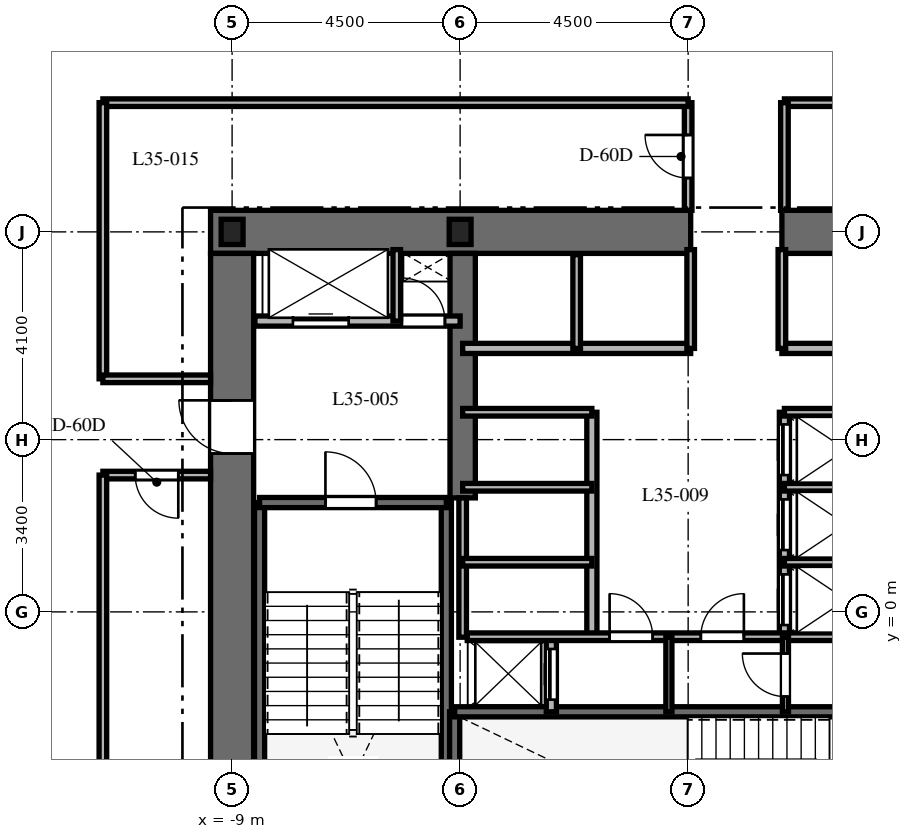
"""IFC4 building model, lengths in metres.
Left out: names, types, materials, properties, quantities, classifications, styles, units other than length and angle.
Written with IfcOpenShell. Run it as: python <this file> out.ifc"""

import sys

from ifc_helpers import new_model, si_unit, direction, frame, frame_2d, origin, origin_2d, place, context, subcontext, project, spatial, rectangle, i_section, extrude, element, fill, save


model = new_model("IFC4")
c1 = context("Model", 3, precision=1e-05, world=origin(), true_north=direction((0.0, 1.0)))
c2 = subcontext(c1, "Body", "Model", "MODEL_VIEW")
j1 = project(units=[si_unit("LENGTHUNIT", "METRE"), si_unit("PLANEANGLEUNIT", "RADIAN")], contexts=[c1])
p1 = place(None, origin())
s1 = spatial("IfcSite", under=j1, at=p1, CompositionType="ELEMENT")
p2 = place(p1, origin())
s2 = spatial("IfcBuilding", under=s1, at=p2, CompositionType="ELEMENT")
p3 = place(p2, frame((0.0, 0.0, 144.3)))
s3 = spatial("IfcBuildingStorey", under=s2, at=p3, CompositionType="ELEMENT", Elevation=144.3)
p4 = place(p3, frame((-9.425, 7.5, 0.0), z_axis=(0.0, 0.0, 1.0), x_axis=(1.0, 0.0, 0.0)))
e1 = element("IfcWall", 1, at=p4, inside=s3, PredefinedType="SHEAR", context=c2, shape_type="SweptSolid", body=[
    extrude(rectangle(XDim=9.475, YDim=0.85, at=frame_2d((4.738, 0.0))), origin(), (0.0, 0.0, 1.0), 3.7),
])
p5 = place(p3, frame((1.85, 7.5, 0.0), z_axis=(0.0, 0.0, 1.0), x_axis=(1.0, 0.0, 0.0)))
e2 = element("IfcWall", 2, at=p5, inside=s3, PredefinedType="SHEAR", context=c2, shape_type="SweptSolid", body=[
    extrude(rectangle(XDim=7.575, YDim=0.85, at=frame_2d((3.788, 0.0))), origin(), (0.0, 0.0, 1.0), 3.7),
])
p6 = place(p3, frame((-9.0, -7.075, 0.0), z_axis=(0.0, 0.0, 1.0), x_axis=(0.0, 1.0, 0.0)))
e3 = element("IfcWall", 3, at=p6, inside=s3, PredefinedType="SHEAR", context=c2, shape_type="SweptSolid", body=[
    extrude(rectangle(XDim=14.15, YDim=0.85, at=frame_2d((7.075, 0.0))), origin(), (0.0, 0.0, 1.0), 3.7),
])
p7 = place(p6, frame((10.2, 0.0, 0.0)))
e4 = element("IfcOpeningElement", 4, at=p7, cuts=e3, PredefinedType="OPENING", context=c2, shape_type="SweptSolid", body=[
    extrude(rectangle(XDim=1.05, YDim=2.15, at=frame_2d((0.525, 1.075))), frame((0.0, 0.435, 0.0), z_axis=(0.0, -1.0, 0.0), x_axis=(1.0, 0.0, 0.0)), (0.0, 0.0, 1.0), 0.87),
])
p8 = place(p3, frame((-4.45, 2.25, 0.0), z_axis=(0.0, 0.0, 1.0), x_axis=(0.0, 1.0, 0.0)))
e5 = element("IfcWall", 5, at=p8, inside=s3, PredefinedType="SHEAR", context=c2, shape_type="SweptSolid", body=[
    extrude(rectangle(XDim=4.825, YDim=0.5, at=frame_2d((2.413, 0.0))), origin(), (0.0, 0.0, 1.0), 3.7),
])
for number, where, z_axis, x_axis in (
    (6, (-8.458, -6.985, 0.0), (0.0, 0.0, 1.0), (0.0, 1.0, 0.0)),
    (7, (-4.772, -6.985, 0.0), (0.0, 0.0, 1.0), (0.0, 1.0, 0.0)),
):
    element("IfcWall", number, at=place(p3, frame(where, z_axis=z_axis, x_axis=x_axis)), inside=s3, PredefinedType="SHEAR", context=c2, shape_type="SweptSolid", body=[
        extrude(rectangle(XDim=9.143, YDim=0.2, at=frame_2d((4.572, 0.0))), origin(), (0.0, 0.0, 1.0), 3.7),
    ])
p9 = place(p3, frame((-8.458, 2.158, 0.0), z_axis=(0.0, 0.0, 1.0), x_axis=(1.0, 0.0, 0.0)))
e8 = element("IfcWall", 8, at=p9, inside=s3, PredefinedType="SHEAR", context=c2, shape_type="SweptSolid", body=[
    extrude(rectangle(XDim=3.686, YDim=0.2, at=frame_2d((1.843, 0.0))), origin(), (0.0, 0.0, 1.0), 3.7),
])
p10 = place(p9, frame((1.3, 0.0, 0.0)))
e9 = element("IfcOpeningElement", 9, at=p10, cuts=e8, PredefinedType="OPENING", context=c2, shape_type="SweptSolid", body=[
    extrude(rectangle(XDim=1.0, YDim=2.15, at=frame_2d((0.5, 1.075))), frame((0.0, 0.11, 0.0), z_axis=(0.0, -1.0, 0.0), x_axis=(1.0, 0.0, 0.0)), (0.0, 0.0, 1.0), 0.22),
])
p11 = place(p3, frame((-4.608, -5.658, 0.0), z_axis=(0.0, 0.0, 1.0), x_axis=(0.0, 1.0, 0.0)))
e10 = element("IfcWall", 10, at=p11, inside=s3, PredefinedType="SHEAR", context=c2, shape_type="SweptSolid", body=[
    extrude(rectangle(XDim=3.686, YDim=0.2, at=frame_2d((1.843, 0.0))), origin(), (0.0, 0.0, 1.0), 3.7),
])
p12 = place(p3, frame((-4.608, -1.972, 0.0), z_axis=(0.0, 0.0, 1.0), x_axis=(1.0, 0.0, 0.0)))
e11 = element("IfcWall", 11, at=p12, inside=s3, PredefinedType="SHEAR", context=c2, shape_type="SweptSolid", body=[
    extrude(rectangle(XDim=9.166, YDim=0.2, at=frame_2d((4.583, 0.0))), origin(), (0.0, 0.0, 1.0), 3.7),
])
for number, where, z_axis, x_axis in (
    (12, (-4.5, 7.5, 0.0), (0.0, 0.0, 1.0), (1.0, 0.0, 0.0)),
    (13, (-9.0, 7.5, 0.0), (0.0, 0.0, 1.0), (1.0, 0.0, 0.0)),
):
    element("IfcColumn", number, at=place(p3, frame(where, z_axis=z_axis, x_axis=x_axis)), inside=s3, PredefinedType="COLUMN", context=c2, shape_type="SweptSolid", body=[
        extrude(i_section(OverallWidth=0.432, OverallDepth=0.498, WebThickness=0.056, FlangeThickness=0.089, at=origin_2d()), origin(), (0.0, 0.0, 1.0), 3.7),
    ])
p13 = place(p3, frame((-8.55, 5.74, 0.0), z_axis=(0.0, 0.0, 1.0), x_axis=(1.0, 0.0, 0.0)))
e14 = element("IfcWall", 14, at=p13, inside=s3, PredefinedType="PARTITIONING", context=c2, shape_type="SweptSolid", body=[
    extrude(rectangle(XDim=4.05, YDim=0.2, at=frame_2d((2.025, 0.0))), origin(), (0.0, 0.0, 1.0), 3.4),
])
p14 = place(p13, frame((0.75, 0.0, 0.0)))
e15 = element("IfcOpeningElement", 15, at=p14, cuts=e14, PredefinedType="OPENING", context=c2, shape_type="SweptSolid", body=[
    extrude(rectangle(XDim=1.1, YDim=2.2, at=frame_2d((0.55, 1.1))), frame((0.0, 0.11, 0.0), z_axis=(0.0, -1.0, 0.0), x_axis=(1.0, 0.0, 0.0)), (0.0, 0.0, 1.0), 0.22),
])
p15 = place(p13, frame((2.9, 0.0, 0.0)))
e16 = element("IfcOpeningElement", 16, at=p15, cuts=e14, PredefinedType="OPENING", context=c2, shape_type="SweptSolid", body=[
    extrude(rectangle(XDim=0.85, YDim=2.03, at=frame_2d((0.425, 1.015))), frame((0.0, 0.11, 0.0), z_axis=(0.0, -1.0, 0.0), x_axis=(1.0, 0.0, 0.0)), (0.0, 0.0, 1.0), 0.22),
])
p16 = place(p3, frame((-5.75, 5.74, 0.0), z_axis=(0.0, 0.0, 1.0), x_axis=(0.0, 1.0, 0.0)))
e17 = element("IfcWall", 17, at=p16, inside=s3, PredefinedType="PARTITIONING", context=c2, shape_type="SweptSolid", body=[
    extrude(rectangle(XDim=1.41, YDim=0.15, at=frame_2d((0.705, 0.0))), origin(), (0.0, 0.0, 1.0), 3.4),
])
p17 = place(p3, frame((-2.7, -1.972, 0.0), z_axis=(0.0, 0.0, 1.0), x_axis=(0.0, 1.0, 0.0)))
e18 = element("IfcWall", 18, at=p17, inside=s3, PredefinedType="PARTITIONING", context=c2, shape_type="SweptSolid", body=[
    extrude(rectangle(XDim=1.472, YDim=0.2, at=frame_2d((0.736, 0.0))), origin(), (0.0, 0.0, 1.0), 3.4),
])
p18 = place(p17, frame((0.24, 0.0, 0.0)))
e19 = element("IfcOpeningElement", 19, at=p18, cuts=e18, PredefinedType="OPENING", context=c2, shape_type="SweptSolid", body=[
    extrude(rectangle(XDim=1.0, YDim=2.2, at=frame_2d((0.5, 1.1))), frame((0.0, 0.11, 0.0), z_axis=(0.0, -1.0, 0.0), x_axis=(1.0, 0.0, 0.0)), (0.0, 0.0, 1.0), 0.22),
])
p19 = place(p3, frame((-4.45, 5.2, 0.0), z_axis=(0.0, 0.0, 1.0), x_axis=(1.0, 0.0, 0.0)))
e20 = element("IfcWall", 20, at=p19, inside=s3, PredefinedType="PARTITIONING", context=c2, shape_type="SweptSolid", body=[
    extrude(rectangle(XDim=4.5, YDim=0.2, at=frame_2d((2.25, 0.0))), origin(), (0.0, 0.0, 1.0), 3.4),
])
p20 = place(p3, frame((1.85, 5.2, 0.0), z_axis=(0.0, 0.0, 1.0), x_axis=(1.0, 0.0, 0.0)))
e21 = element("IfcWall", 21, at=p20, inside=s3, PredefinedType="PARTITIONING", context=c2, shape_type="SweptSolid", body=[
    extrude(rectangle(XDim=2.6, YDim=0.2, at=frame_2d((1.3, 0.0))), origin(), (0.0, 0.0, 1.0), 3.4),
])
p21 = place(p3, frame((-2.2, 5.2, 0.0), z_axis=(0.0, 0.0, 1.0), x_axis=(0.0, 1.0, 0.0)))
e22 = element("IfcWall", 22, at=p21, inside=s3, PredefinedType="PARTITIONING", context=c2, shape_type="SweptSolid", body=[
    extrude(rectangle(XDim=1.85, YDim=0.15, at=frame_2d((0.925, 0.0))), origin(), (0.0, 0.0, 1.0), 3.4),
])
for number, where, z_axis, x_axis in (
    (23, (0.05, 5.2, 0.0), (0.0, 0.0, 1.0), (0.0, 1.0, 0.0)),
    (24, (1.85, 5.2, 0.0), (0.0, 0.0, 1.0), (0.0, 1.0, 0.0)),
):
    element("IfcWall", number, at=place(p3, frame(where, z_axis=z_axis, x_axis=x_axis)), inside=s3, PredefinedType="PARTITIONING", context=c2, shape_type="SweptSolid", body=[
        extrude(rectangle(XDim=1.95, YDim=0.15, at=frame_2d((0.975, 0.0))), origin(), (0.0, 0.0, 1.0), 3.4),
    ])
p22 = place(p3, frame((-4.45, -0.5, 0.0), z_axis=(0.0, 0.0, 1.0), x_axis=(0.0, 1.0, 0.0)))
e25 = element("IfcWall", 25, at=p22, inside=s3, PredefinedType="PARTITIONING", context=c2, shape_type="SweptSolid", body=[
    extrude(rectangle(XDim=2.75, YDim=0.15, at=frame_2d((1.375, 0.0))), origin(), (0.0, 0.0, 1.0), 3.4),
])
p23 = place(p3, frame((-1.9, -0.5, 0.0), z_axis=(0.0, 0.0, 1.0), x_axis=(0.0, 1.0, 0.0)))
e26 = element("IfcWall", 26, at=p23, inside=s3, PredefinedType="PARTITIONING", context=c2, shape_type="SweptSolid", body=[
    extrude(rectangle(XDim=4.44, YDim=0.2, at=frame_2d((2.22, 0.0))), origin(), (0.0, 0.0, 1.0), 3.4),
])
for number, where, z_axis, x_axis in (
    (27, (-4.45, 3.94, 0.0), (0.0, 0.0, 1.0), (1.0, 0.0, 0.0)),
    (28, (-4.45, 0.98, 0.0), (0.0, 0.0, 1.0), (1.0, 0.0, 0.0)),
    (29, (-4.45, 2.46, 0.0), (0.0, 0.0, 1.0), (1.0, 0.0, 0.0)),
):
    element("IfcWall", number, at=place(p3, frame(where, z_axis=z_axis, x_axis=x_axis)), inside=s3, PredefinedType="PARTITIONING", context=c2, shape_type="SweptSolid", body=[
        extrude(rectangle(XDim=2.55, YDim=0.15, at=frame_2d((1.275, 0.0))), origin(), (0.0, 0.0, 1.0), 3.4),
    ])
p24 = place(p3, frame((1.9, -0.5, 0.0), z_axis=(0.0, 0.0, 1.0), x_axis=(0.0, 1.0, 0.0)))
e30 = element("IfcWall", 30, at=p24, inside=s3, PredefinedType="PARTITIONING", context=c2, shape_type="SweptSolid", body=[
    extrude(rectangle(XDim=4.44, YDim=0.2, at=frame_2d((2.22, 0.0))), origin(), (0.0, 0.0, 1.0), 3.4),
])
p25 = place(p24, frame((0.24, 0.0, 0.0)))
e31 = element("IfcOpeningElement", 31, at=p25, cuts=e30, PredefinedType="OPENING", context=c2, shape_type="SweptSolid", body=[
    extrude(rectangle(XDim=1.0, YDim=2.2, at=frame_2d((0.5, 1.1))), frame((0.0, 0.11, 0.0), z_axis=(0.0, -1.0, 0.0), x_axis=(1.0, 0.0, 0.0)), (0.0, 0.0, 1.0), 0.22),
])
p26 = place(p24, frame((1.72, 0.0, 0.0)))
e32 = element("IfcOpeningElement", 32, at=p26, cuts=e30, PredefinedType="OPENING", context=c2, shape_type="SweptSolid", body=[
    extrude(rectangle(XDim=1.0, YDim=2.2, at=frame_2d((0.5, 1.1))), frame((0.0, 0.11, 0.0), z_axis=(0.0, -1.0, 0.0), x_axis=(1.0, 0.0, 0.0)), (0.0, 0.0, 1.0), 0.22),
])
p27 = place(p24, frame((3.2, 0.0, 0.0)))
e33 = element("IfcOpeningElement", 33, at=p27, cuts=e30, PredefinedType="OPENING", context=c2, shape_type="SweptSolid", body=[
    extrude(rectangle(XDim=1.0, YDim=2.2, at=frame_2d((0.5, 1.1))), frame((0.0, 0.11, 0.0), z_axis=(0.0, -1.0, 0.0), x_axis=(1.0, 0.0, 0.0)), (0.0, 0.0, 1.0), 0.22),
])
for number, where, z_axis, x_axis in (
    (34, (1.9, 3.94, 0.0), (0.0, 0.0, 1.0), (1.0, 0.0, 0.0)),
    (35, (1.9, 0.98, 0.0), (0.0, 0.0, 1.0), (1.0, 0.0, 0.0)),
    (36, (1.9, 2.46, 0.0), (0.0, 0.0, 1.0), (1.0, 0.0, 0.0)),
):
    element("IfcWall", number, at=place(p3, frame(where, z_axis=z_axis, x_axis=x_axis)), inside=s3, PredefinedType="PARTITIONING", context=c2, shape_type="SweptSolid", body=[
        extrude(rectangle(XDim=2.55, YDim=0.15, at=frame_2d((1.275, 0.0))), origin(), (0.0, 0.0, 1.0), 3.4),
    ])
p28 = place(p3, frame((-4.36, -0.49, 0.0), z_axis=(0.0, 0.0, 1.0), x_axis=(1.0, 0.0, 0.0)))
e37 = element("IfcWall", 37, at=p28, inside=s3, PredefinedType="PARTITIONING", context=c2, shape_type="SweptSolid", body=[
    extrude(rectangle(XDim=8.72, YDim=0.15, at=frame_2d((4.36, 0.0))), origin(), (0.0, 0.0, 1.0), 3.4),
])
p29 = place(p28, frame((2.81, 0.0, 0.0)))
e38 = element("IfcOpeningElement", 38, at=p29, cuts=e37, PredefinedType="OPENING", context=c2, shape_type="SweptSolid", body=[
    extrude(rectangle(XDim=0.85, YDim=2.03, at=frame_2d((0.425, 1.015))), frame((0.0, 0.085, 0.0), z_axis=(0.0, -1.0, 0.0), x_axis=(1.0, 0.0, 0.0)), (0.0, 0.0, 1.0), 0.17),
])
p30 = place(p28, frame((4.61, 0.0, 0.0)))
e39 = element("IfcOpeningElement", 39, at=p30, cuts=e37, PredefinedType="OPENING", context=c2, shape_type="SweptSolid", body=[
    extrude(rectangle(XDim=0.85, YDim=2.03, at=frame_2d((0.425, 1.015))), frame((0.0, 0.085, 0.0), z_axis=(0.0, -1.0, 0.0), x_axis=(1.0, 0.0, 0.0)), (0.0, 0.0, 1.0), 0.17),
])
p31 = place(p3, frame((-0.38, -1.972, 0.0), z_axis=(0.0, 0.0, 1.0), x_axis=(0.0, 1.0, 0.0)))
e40 = element("IfcWall", 40, at=p31, inside=s3, PredefinedType="PARTITIONING", context=c2, shape_type="SweptSolid", body=[
    extrude(rectangle(XDim=1.472, YDim=0.12, at=frame_2d((0.736, 0.0))), origin(), (0.0, 0.0, 1.0), 3.4),
])
p32 = place(p3, frame((1.92, -1.972, 0.0), z_axis=(0.0, 0.0, 1.0), x_axis=(0.0, 1.0, 0.0)))
e41 = element("IfcWall", 41, at=p32, inside=s3, PredefinedType="PARTITIONING", context=c2, shape_type="SweptSolid", body=[
    extrude(rectangle(XDim=1.472, YDim=0.12, at=frame_2d((0.736, 0.0))), origin(), (0.0, 0.0, 1.0), 3.4),
])
p33 = place(p32, frame((0.3, 0.0, 0.0)))
e42 = element("IfcOpeningElement", 42, at=p33, cuts=e41, PredefinedType="OPENING", context=c2, shape_type="SweptSolid", body=[
    extrude(rectangle(XDim=0.85, YDim=2.03, at=frame_2d((0.425, 1.015))), frame((0.0, 0.07, 0.0), z_axis=(0.0, -1.0, 0.0), x_axis=(1.0, 0.0, 0.0)), (0.0, 0.0, 1.0), 0.14),
])
p34 = place(p3, frame((11.55, 10.05, 0.0), z_axis=(0.0, 0.0, 1.0), x_axis=(-1.0, 0.0, 0.0)))
e43 = element("IfcWall", 43, at=p34, inside=s3, PredefinedType="PARTITIONING", context=c2, shape_type="SweptSolid", body=[
    extrude(rectangle(XDim=9.65, YDim=0.15, at=frame_2d((4.825, 0.0))), origin(), (0.0, 0.0, 1.0), 2.84),
])
p35 = place(p3, frame((1.9, 10.05, 0.0), z_axis=(0.0, 0.0, 1.0), x_axis=(0.0, -1.0, 0.0)))
e44 = element("IfcWall", 44, at=p35, inside=s3, PredefinedType="PARTITIONING", context=c2, shape_type="SweptSolid", body=[
    extrude(rectangle(XDim=2.125, YDim=0.15, at=frame_2d((1.062, 0.0))), origin(), (0.0, 0.0, 1.0), 3.4),
])
p36 = place(p3, frame((0.0, 7.925, 0.0), z_axis=(0.0, 0.0, 1.0), x_axis=(0.0, 1.0, 0.0)))
e45 = element("IfcWall", 45, at=p36, inside=s3, PredefinedType="PARTITIONING", context=c2, shape_type="SweptSolid", body=[
    extrude(rectangle(XDim=2.125, YDim=0.15, at=frame_2d((1.062, 0.0))), origin(), (0.0, 0.0, 1.0), 3.4),
])
p37 = place(p36, frame((0.638, 0.0, 0.0)))
e46 = element("IfcOpeningElement", 46, at=p37, cuts=e45, PredefinedType="OPENING", context=c2, shape_type="SweptSolid", body=[
    extrude(rectangle(XDim=0.85, YDim=2.03, at=frame_2d((0.425, 1.015))), frame((0.0, 0.085, 0.0), z_axis=(0.0, -1.0, 0.0), x_axis=(1.0, 0.0, 0.0)), (0.0, 0.0, 1.0), 0.17),
])
p38 = place(p3, frame((0.0, 10.05, 0.0), z_axis=(0.0, 0.0, 1.0), x_axis=(-1.0, 0.0, 0.0)))
e47 = element("IfcWall", 47, at=p38, inside=s3, PredefinedType="PARTITIONING", context=c2, shape_type="SweptSolid", body=[
    extrude(rectangle(XDim=11.55, YDim=0.15, at=frame_2d((5.775, 0.0))), origin(), (0.0, 0.0, 1.0), 2.84),
])
p39 = place(p3, frame((-11.55, 10.05, 0.0), z_axis=(0.0, 0.0, 1.0), x_axis=(0.0, -1.0, 0.0)))
e48 = element("IfcWall", 48, at=p39, inside=s3, PredefinedType="PARTITIONING", context=c2, shape_type="SweptSolid", body=[
    extrude(rectangle(XDim=5.45, YDim=0.15, at=frame_2d((2.725, 0.0))), origin(), (0.0, 0.0, 1.0), 2.84),
])
p40 = place(p3, frame((-11.55, 4.6, 0.0), z_axis=(0.0, 0.0, 1.0), x_axis=(1.0, 0.0, 0.0)))
e49 = element("IfcWall", 49, at=p40, inside=s3, PredefinedType="PARTITIONING", context=c2, shape_type="SweptSolid", body=[
    extrude(rectangle(XDim=2.125, YDim=0.15, at=frame_2d((1.062, 0.0))), origin(), (0.0, 0.0, 1.0), 3.4),
])
p41 = place(p3, frame((-9.425, 2.7, 0.0), z_axis=(0.0, 0.0, 1.0), x_axis=(-1.0, 0.0, 0.0)))
e50 = element("IfcWall", 50, at=p41, inside=s3, PredefinedType="PARTITIONING", context=c2, shape_type="SweptSolid", body=[
    extrude(rectangle(XDim=2.125, YDim=0.15, at=frame_2d((1.062, 0.0))), origin(), (0.0, 0.0, 1.0), 3.4),
])
p42 = place(p41, frame((0.637, 0.0, 0.0)))
e51 = element("IfcOpeningElement", 51, at=p42, cuts=e50, PredefinedType="OPENING", context=c2, shape_type="SweptSolid", body=[
    extrude(rectangle(XDim=0.85, YDim=2.03, at=frame_2d((0.425, 1.015))), frame((0.0, 0.085, 0.0), z_axis=(0.0, -1.0, 0.0), x_axis=(1.0, 0.0, 0.0)), (0.0, 0.0, 1.0), 0.17),
])
p43 = place(p3, frame((-11.55, 2.7, 0.0), z_axis=(0.0, 0.0, 1.0), x_axis=(0.0, -1.0, 0.0)))
e52 = element("IfcWall", 52, at=p43, inside=s3, PredefinedType="PARTITIONING", context=c2, shape_type="SweptSolid", body=[
    extrude(rectangle(XDim=12.75, YDim=0.15, at=frame_2d((6.375, 0.0))), origin(), (0.0, 0.0, 1.0), 2.84),
])
p44 = place(p10, origin())
e53 = element("IfcDoor", 53, at=p44, inside=s3, OperationType="SINGLE_SWING_LEFT", PredefinedType="DOOR", context=c2, shape_type="SweptSolid", body=[
    extrude(rectangle(XDim=1.0, YDim=2.15, at=frame_2d((0.5, 1.075))), frame((0.0, 0.025, 0.0), z_axis=(0.0, -1.0, 0.0), x_axis=(1.0, 0.0, 0.0)), (0.0, 0.0, 1.0), 0.05),
])
fill(e9, e53)
p45 = place(p7, origin())
e54 = element("IfcDoor", 54, at=p45, inside=s3, OperationType="SINGLE_SWING_RIGHT", PredefinedType="DOOR", context=c2, shape_type="SweptSolid", body=[
    extrude(rectangle(XDim=1.05, YDim=2.15, at=frame_2d((0.525, 1.075))), frame((0.0, 0.025, 0.0), z_axis=(0.0, -1.0, 0.0), x_axis=(1.0, 0.0, 0.0)), (0.0, 0.0, 1.0), 0.05),
])
fill(e4, e54)
p46 = place(p14, origin())
e55 = element("IfcDoor", 55, at=p46, inside=s3, OperationType="SLIDING_TO_LEFT", PredefinedType="DOOR", context=c2, shape_type="SweptSolid", body=[
    extrude(rectangle(XDim=1.1, YDim=2.2, at=frame_2d((0.55, 1.1))), frame((0.0, 0.025, 0.0), z_axis=(0.0, -1.0, 0.0), x_axis=(1.0, 0.0, 0.0)), (0.0, 0.0, 1.0), 0.05),
])
fill(e15, e55)
p47 = place(p15, origin())
e56 = element("IfcDoor", 56, at=p47, inside=s3, OperationType="SINGLE_SWING_LEFT", PredefinedType="DOOR", context=c2, shape_type="SweptSolid", body=[
    extrude(rectangle(XDim=0.85, YDim=2.03, at=frame_2d((0.425, 1.015))), frame((0.0, 0.025, 0.0), z_axis=(0.0, -1.0, 0.0), x_axis=(1.0, 0.0, 0.0)), (0.0, 0.0, 1.0), 0.05),
])
fill(e16, e56)
p48 = place(p18, origin())
e57 = element("IfcDoor", 57, at=p48, inside=s3, OperationType="SLIDING_TO_LEFT", PredefinedType="DOOR", context=c2, shape_type="SweptSolid", body=[
    extrude(rectangle(XDim=1.0, YDim=2.2, at=frame_2d((0.5, 1.1))), frame((0.0, 0.025, 0.0), z_axis=(0.0, -1.0, 0.0), x_axis=(1.0, 0.0, 0.0)), (0.0, 0.0, 1.0), 0.05),
])
fill(e19, e57)
p49 = place(p25, origin())
e58 = element("IfcDoor", 58, at=p49, inside=s3, OperationType="SLIDING_TO_RIGHT", PredefinedType="DOOR", context=c2, shape_type="SweptSolid", body=[
    extrude(rectangle(XDim=1.0, YDim=2.2, at=frame_2d((0.5, 1.1))), frame((0.0, 0.025, 0.0), z_axis=(0.0, -1.0, 0.0), x_axis=(1.0, 0.0, 0.0)), (0.0, 0.0, 1.0), 0.05),
])
fill(e31, e58)
p50 = place(p26, origin())
e59 = element("IfcDoor", 59, at=p50, inside=s3, OperationType="SLIDING_TO_RIGHT", PredefinedType="DOOR", context=c2, shape_type="SweptSolid", body=[
    extrude(rectangle(XDim=1.0, YDim=2.2, at=frame_2d((0.5, 1.1))), frame((0.0, 0.025, 0.0), z_axis=(0.0, -1.0, 0.0), x_axis=(1.0, 0.0, 0.0)), (0.0, 0.0, 1.0), 0.05),
])
fill(e32, e59)
p51 = place(p27, origin())
e60 = element("IfcDoor", 60, at=p51, inside=s3, OperationType="SLIDING_TO_RIGHT", PredefinedType="DOOR", context=c2, shape_type="SweptSolid", body=[
    extrude(rectangle(XDim=1.0, YDim=2.2, at=frame_2d((0.5, 1.1))), frame((0.0, 0.025, 0.0), z_axis=(0.0, -1.0, 0.0), x_axis=(1.0, 0.0, 0.0)), (0.0, 0.0, 1.0), 0.05),
])
fill(e33, e60)
p52 = place(p29, origin())
e61 = element("IfcDoor", 61, at=p52, inside=s3, OperationType="SINGLE_SWING_LEFT", PredefinedType="DOOR", context=c2, shape_type="SweptSolid", body=[
    extrude(rectangle(XDim=0.85, YDim=2.03, at=frame_2d((0.425, 1.015))), frame((0.0, 0.025, 0.0), z_axis=(0.0, -1.0, 0.0), x_axis=(1.0, 0.0, 0.0)), (0.0, 0.0, 1.0), 0.05),
])
fill(e38, e61)
p53 = place(p30, origin())
e62 = element("IfcDoor", 62, at=p53, inside=s3, OperationType="SINGLE_SWING_RIGHT", PredefinedType="DOOR", context=c2, shape_type="SweptSolid", body=[
    extrude(rectangle(XDim=0.85, YDim=2.03, at=frame_2d((0.425, 1.015))), frame((0.0, 0.025, 0.0), z_axis=(0.0, -1.0, 0.0), x_axis=(1.0, 0.0, 0.0)), (0.0, 0.0, 1.0), 0.05),
])
fill(e39, e62)
p54 = place(p33, origin())
e63 = element("IfcDoor", 63, at=p54, inside=s3, OperationType="SINGLE_SWING_RIGHT", PredefinedType="DOOR", context=c2, shape_type="SweptSolid", body=[
    extrude(rectangle(XDim=0.85, YDim=2.03, at=frame_2d((0.425, 1.015))), frame((0.0, 0.025, 0.0), z_axis=(0.0, -1.0, 0.0), x_axis=(1.0, 0.0, 0.0)), (0.0, 0.0, 1.0), 0.05),
])
fill(e42, e63)
p55 = place(p42, origin())
e64 = element("IfcDoor", 64, at=p55, inside=s3, OperationType="SINGLE_SWING_LEFT", PredefinedType="DOOR", context=c2, shape_type="SweptSolid", body=[
    extrude(rectangle(XDim=0.85, YDim=2.03, at=frame_2d((0.425, 1.015))), frame((0.0, 0.025, 0.0), z_axis=(0.0, -1.0, 0.0), x_axis=(1.0, 0.0, 0.0)), (0.0, 0.0, 1.0), 0.05),
])
fill(e51, e64)
p56 = place(p37, origin())
e65 = element("IfcDoor", 65, at=p56, inside=s3, OperationType="SINGLE_SWING_RIGHT", PredefinedType="DOOR", context=c2, shape_type="SweptSolid", body=[
    extrude(rectangle(XDim=0.85, YDim=2.03, at=frame_2d((0.425, 1.015))), frame((0.0, 0.025, 0.0), z_axis=(0.0, -1.0, 0.0), x_axis=(1.0, 0.0, 0.0)), (0.0, 0.0, 1.0), 0.05),
])
fill(e46, e65)
save(model, sys.argv[1])
